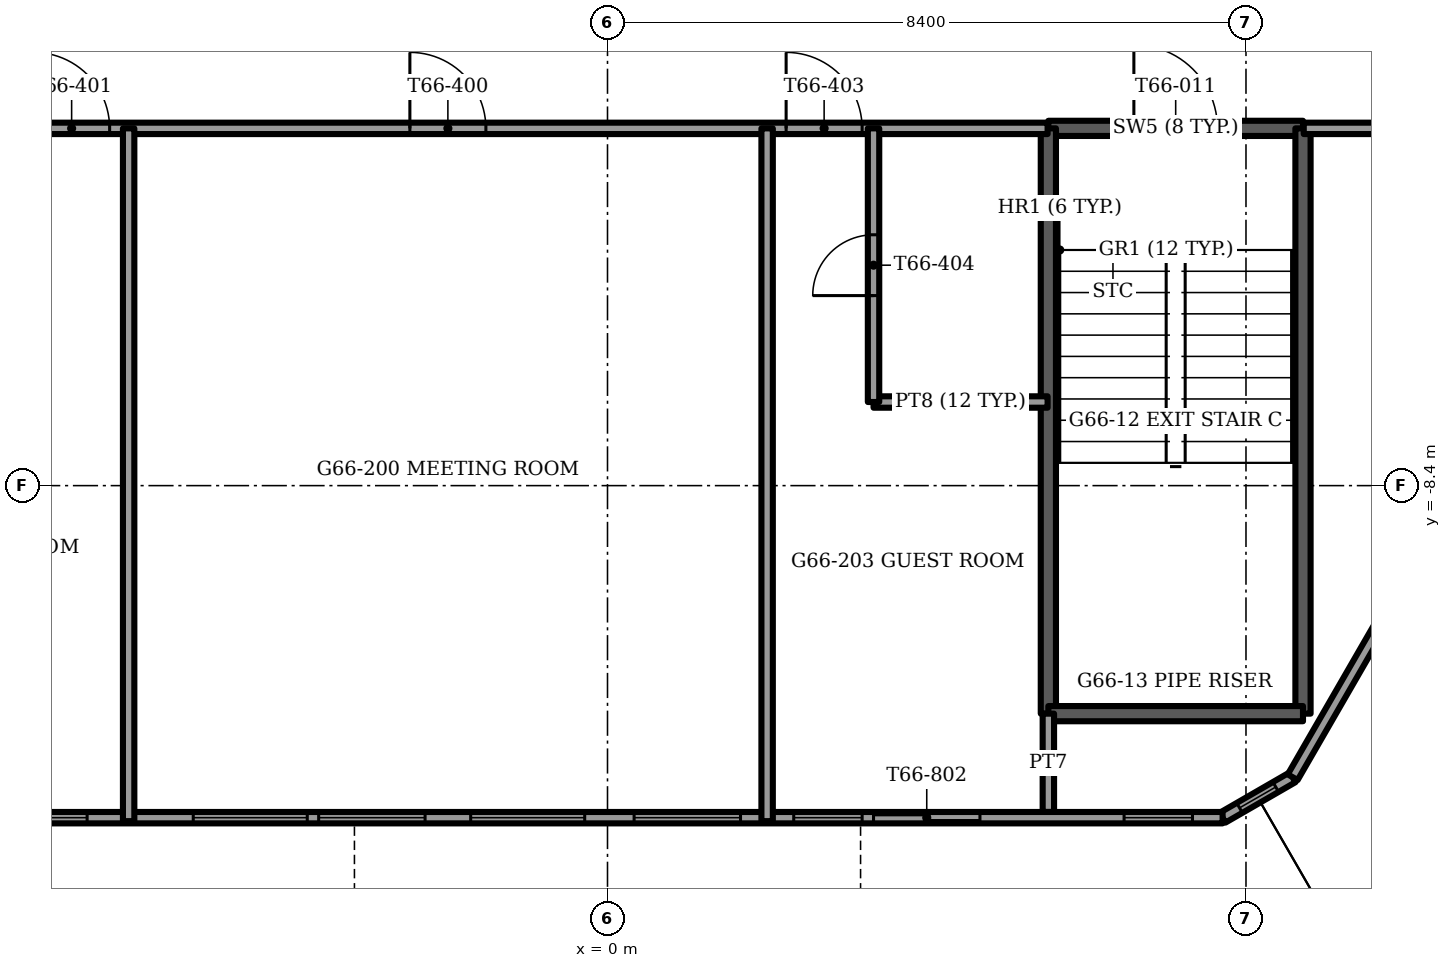
"""IFC4 building model, lengths in metres.
Left out: names, types, materials, properties, quantities, classifications, styles, units other than length and angle.
Written with IfcOpenShell. Run it as: python <this file> out.ifc"""

import sys

from ifc_helpers import new_model, si_unit, direction, frame, frame_2d, origin, place, context, subcontext, project, spatial, rectangle, extrude, element, fill, save


model = new_model("IFC4")
c1 = context("Model", 3, precision=1e-05, world=origin(), true_north=direction((0.0, 1.0)))
c2 = subcontext(c1, "Body", "Model", "MODEL_VIEW")
j1 = project(units=[si_unit("LENGTHUNIT", "METRE"), si_unit("PLANEANGLEUNIT", "RADIAN")], contexts=[c1])
p1 = place(None, origin())
s1 = spatial("IfcSite", under=j1, at=p1, CompositionType="ELEMENT")
p2 = place(p1, origin())
s2 = spatial("IfcBuilding", under=s1, at=p2, CompositionType="ELEMENT")
p3 = place(p2, frame((0.0, 0.0, 267.5)))
s3 = spatial("IfcBuildingStorey", under=s2, at=p3, CompositionType="ELEMENT", Elevation=267.5)
p4 = place(p3, frame((-8.092, -12.769, 0.0), z_axis=(0.0, 0.0, 1.0), x_axis=(1.0, 0.0, 0.0)))
e1 = element("IfcWall", 1, at=p4, inside=s3, PredefinedType="SOLIDWALL", context=c2, shape_type="SweptSolid", body=[
    extrude(rectangle(XDim=16.185, YDim=0.15, at=frame_2d((8.092, 0.0))), origin(), (0.0, 0.0, 1.0), 3.45),
])
p5 = place(p4, frame((2.642, 0.0, 0.15)))
e2 = element("IfcOpeningElement", 2, at=p5, cuts=e1, PredefinedType="OPENING", context=c2, shape_type="SweptSolid", body=[
    extrude(rectangle(XDim=1.5, YDim=2.85, at=frame_2d((0.75, 1.425))), frame((0.0, 0.075, 0.0), z_axis=(0.0, -1.0, 0.0), x_axis=(1.0, 0.0, 0.0)), (0.0, 0.0, 1.0), 0.15),
])
p6 = place(p4, frame((4.292, 0.0, 0.15)))
e3 = element("IfcOpeningElement", 3, at=p6, cuts=e1, PredefinedType="OPENING", context=c2, shape_type="SweptSolid", body=[
    extrude(rectangle(XDim=1.4, YDim=2.85, at=frame_2d((0.7, 1.425))), frame((0.0, 0.075, 0.0), z_axis=(0.0, -1.0, 0.0), x_axis=(1.0, 0.0, 0.0)), (0.0, 0.0, 1.0), 0.15),
])
p7 = place(p4, frame((6.292, 0.0, 0.15)))
e4 = element("IfcOpeningElement", 4, at=p7, cuts=e1, PredefinedType="OPENING", context=c2, shape_type="SweptSolid", body=[
    extrude(rectangle(XDim=1.5, YDim=2.85, at=frame_2d((0.75, 1.425))), frame((0.0, 0.075, 0.0), z_axis=(0.0, -1.0, 0.0), x_axis=(1.0, 0.0, 0.0)), (0.0, 0.0, 1.0), 0.15),
])
p8 = place(p4, frame((8.442, 0.0, 0.15)))
e5 = element("IfcOpeningElement", 5, at=p8, cuts=e1, PredefinedType="OPENING", context=c2, shape_type="SweptSolid", body=[
    extrude(rectangle(XDim=1.4, YDim=2.85, at=frame_2d((0.7, 1.425))), frame((0.0, 0.075, 0.0), z_axis=(0.0, -1.0, 0.0), x_axis=(1.0, 0.0, 0.0)), (0.0, 0.0, 1.0), 0.15),
])
p9 = place(p4, frame((10.542, 0.0, 0.15)))
e6 = element("IfcOpeningElement", 6, at=p9, cuts=e1, PredefinedType="OPENING", context=c2, shape_type="SweptSolid", body=[
    extrude(rectangle(XDim=0.9, YDim=2.85, at=frame_2d((0.45, 1.425))), frame((0.0, 0.075, 0.0), z_axis=(0.0, -1.0, 0.0), x_axis=(1.0, 0.0, 0.0)), (0.0, 0.0, 1.0), 0.15),
])
p10 = place(p4, frame((11.592, 0.0, 0.0)))
e7 = element("IfcOpeningElement", 7, at=p10, cuts=e1, PredefinedType="OPENING", context=c2, shape_type="SweptSolid", body=[
    extrude(rectangle(XDim=1.4, YDim=2.4, at=frame_2d((0.7, 1.2))), frame((0.0, 0.075, 0.0), z_axis=(0.0, -1.0, 0.0), x_axis=(1.0, 0.0, 0.0)), (0.0, 0.0, 1.0), 0.15),
])
p11 = place(p4, frame((0.346, 0.0, 0.15)))
e8 = element("IfcOpeningElement", 8, at=p11, cuts=e1, PredefinedType="OPENING", context=c2, shape_type="SweptSolid", body=[
    extrude(rectangle(XDim=0.9, YDim=2.73, at=frame_2d((0.45, 1.365))), frame((0.0, 0.075, 0.0), z_axis=(0.0, -1.0, 0.0), x_axis=(1.0, 0.0, 0.0)), (0.0, 0.0, 1.0), 0.15),
])
p12 = place(p4, frame((14.889, 0.0, 0.15)))
e9 = element("IfcOpeningElement", 9, at=p12, cuts=e1, PredefinedType="OPENING", context=c2, shape_type="SweptSolid", body=[
    extrude(rectangle(XDim=0.9, YDim=2.73, at=frame_2d((0.45, 1.365))), frame((0.0, 0.075, 0.0), z_axis=(0.0, -1.0, 0.0), x_axis=(1.0, 0.0, 0.0)), (0.0, 0.0, 1.0), 0.15),
])
p13 = place(p3, frame((9.015, -12.236, 0.0), z_axis=(0.0, 0.0, 1.0), x_axis=(0.499998361514, 0.866026349763, 0.0)))
e10 = element("IfcWall", 10, at=p13, inside=s3, PredefinedType="SOLIDWALL", context=c2, shape_type="SweptSolid", body=[
    extrude(rectangle(XDim=12.179, YDim=0.15, at=frame_2d((6.089, 0.0))), origin(), (0.0, 0.0, 1.0), 3.45),
])
p14 = place(p13, frame((2.189, 0.0, 0.15)))
e11 = element("IfcOpeningElement", 11, at=p14, cuts=e10, PredefinedType="OPENING", context=c2, shape_type="SweptSolid", body=[
    extrude(rectangle(XDim=1.5, YDim=2.85, at=frame_2d((0.75, 1.425))), frame((0.0, 0.075, 0.0), z_axis=(0.0, -1.0, 0.0), x_axis=(1.0, 0.0, 0.0)), (0.0, 0.0, 1.0), 0.15),
])
p15 = place(p13, frame((4.389, 0.0, 0.0)))
e12 = element("IfcOpeningElement", 12, at=p15, cuts=e10, PredefinedType="OPENING", context=c2, shape_type="SweptSolid", body=[
    extrude(rectangle(XDim=1.4, YDim=2.4, at=frame_2d((0.7, 1.2))), frame((0.0, 0.075, 0.0), z_axis=(0.0, -1.0, 0.0), x_axis=(1.0, 0.0, 0.0)), (0.0, 0.0, 1.0), 0.15),
])
p16 = place(p13, frame((6.389, 0.0, 0.15)))
e13 = element("IfcOpeningElement", 13, at=p16, cuts=e10, PredefinedType="OPENING", context=c2, shape_type="SweptSolid", body=[
    extrude(rectangle(XDim=0.9, YDim=2.85, at=frame_2d((0.45, 1.425))), frame((0.0, 0.075, 0.0), z_axis=(0.0, -1.0, 0.0), x_axis=(1.0, 0.0, 0.0)), (0.0, 0.0, 1.0), 0.15),
])
p17 = place(p13, frame((7.583, 0.0, 0.0)))
e14 = element("IfcOpeningElement", 14, at=p17, cuts=e10, PredefinedType="OPENING", context=c2, shape_type="SweptSolid", body=[
    extrude(rectangle(XDim=1.4, YDim=2.4, at=frame_2d((0.7, 1.2))), frame((0.0, 0.075, 0.0), z_axis=(0.0, -1.0, 0.0), x_axis=(1.0, 0.0, 0.0)), (0.0, 0.0, 1.0), 0.15),
])
p18 = place(p13, frame((10.834, 0.0, 0.15)))
e15 = element("IfcOpeningElement", 15, at=p18, cuts=e10, PredefinedType="OPENING", context=c2, shape_type="SweptSolid", body=[
    extrude(rectangle(XDim=0.9, YDim=2.73, at=frame_2d((0.45, 1.365))), frame((0.0, 0.075, 0.0), z_axis=(0.0, -1.0, 0.0), x_axis=(1.0, 0.0, 0.0)), (0.0, 0.0, 1.0), 0.15),
])
p19 = place(p3, frame((8.092, -12.769, 0.0), z_axis=(0.0, 0.0, 1.0), x_axis=(0.866048165231, 0.499960573946, 0.0)))
e16 = element("IfcWall", 16, at=p19, inside=s3, PredefinedType="SOLIDWALL", context=c2, shape_type="SweptSolid", body=[
    extrude(rectangle(XDim=1.065, YDim=0.15, at=frame_2d((0.532, 0.0))), origin(), (0.0, 0.0, 1.0), 3.45),
])
p20 = place(p19, frame((0.258, 0.0, 0.15)))
e17 = element("IfcOpeningElement", 17, at=p20, cuts=e16, PredefinedType="OPENING", context=c2, shape_type="SweptSolid", body=[
    extrude(rectangle(XDim=0.55, YDim=2.85, at=frame_2d((0.275, 1.425))), frame((0.0, 0.075, 0.0), z_axis=(0.0, -1.0, 0.0), x_axis=(1.0, 0.0, 0.0)), (0.0, 0.0, 1.0), 0.15),
])
p21 = place(p3, frame((5.8, -3.7, -0.3), z_axis=(0.0, 0.0, 1.0), x_axis=(1.0, 0.0, 0.0)))
e18 = element("IfcWall", 18, at=p21, inside=s3, PredefinedType="SOLIDWALL", context=c2, shape_type="SweptSolid", body=[
    extrude(rectangle(XDim=3.35, YDim=0.2, at=frame_2d((1.675, 0.0))), origin(), (0.0, 0.0, 1.0), 3.75),
])
p22 = place(p21, frame((1.125, 0.0, 0.0)))
e19 = element("IfcOpeningElement", 19, at=p22, cuts=e18, PredefinedType="OPENING", context=c2, shape_type="SweptSolid", body=[
    extrude(rectangle(XDim=1.1, YDim=2.1, at=frame_2d((0.55, 1.05))), frame((0.0, 0.1, 0.0), z_axis=(0.0, -1.0, 0.0), x_axis=(1.0, 0.0, 0.0)), (0.0, 0.0, 1.0), 0.2),
])
for number, where, z_axis, x_axis in (
    (20, (5.8, -3.7, -0.3), (0.0, 0.0, 1.0), (0.0, -1.0, 0.0)),
    (21, (9.15, -3.7, -0.3), (0.0, 0.0, 1.0), (0.0, -1.0, 0.0)),
):
    element("IfcWall", number, at=place(p3, frame(where, z_axis=z_axis, x_axis=x_axis)), inside=s3, PredefinedType="SOLIDWALL", context=c2, shape_type="SweptSolid", body=[
        extrude(rectangle(XDim=7.7, YDim=0.2, at=frame_2d((3.85, 0.0))), origin(), (0.0, 0.0, 1.0), 3.75),
    ])
p23 = place(p3, frame((5.8, -11.4, -0.3), z_axis=(0.0, 0.0, 1.0), x_axis=(1.0, 0.0, 0.0)))
e22 = element("IfcWall", 22, at=p23, inside=s3, PredefinedType="SOLIDWALL", context=c2, shape_type="SweptSolid", body=[
    extrude(rectangle(XDim=3.35, YDim=0.2, at=frame_2d((1.675, 0.0))), origin(), (0.0, 0.0, 1.0), 3.75),
])
p24 = place(p3, frame((5.8, -11.4, 0.0), z_axis=(0.0, 0.0, 1.0), x_axis=(0.0, -1.0, 0.0)))
e23 = element("IfcWall", 23, at=p24, inside=s3, PredefinedType="PARTITIONING", context=c2, shape_type="SweptSolid", body=[
    extrude(rectangle(XDim=1.294, YDim=0.15, at=frame_2d((0.647, 0.0))), origin(), (0.0, 0.0, 1.0), 3.45),
])
p25 = place(p3, frame((3.5, -7.3, 0.0), z_axis=(0.0, 0.0, 1.0), x_axis=(1.0, 0.0, 0.0)))
e24 = element("IfcWall", 24, at=p25, inside=s3, PredefinedType="PARTITIONING", context=c2, shape_type="SweptSolid", body=[
    extrude(rectangle(XDim=2.29, YDim=0.15, at=frame_2d((1.145, 0.0))), origin(), (0.0, 0.0, 1.0), 3.45),
])
p26 = place(p3, frame((-13.995, -3.7, 0.0), z_axis=(0.0, 0.0, 1.0), x_axis=(1.0, 0.0, 0.0)))
e25 = element("IfcWall", 25, at=p26, inside=s3, PredefinedType="PARTITIONING", context=c2, shape_type="SweptSolid", body=[
    extrude(rectangle(XDim=19.785, YDim=0.15, at=frame_2d((9.893, 0.0))), origin(), (0.0, 0.0, 1.0), 3.45),
])
p27 = place(p26, frame((11.395, 0.0, 0.0)))
e26 = element("IfcOpeningElement", 26, at=p27, cuts=e25, PredefinedType="OPENING", context=c2, shape_type="SweptSolid", body=[
    extrude(rectangle(XDim=1.0, YDim=2.1, at=frame_2d((0.5, 1.05))), frame((0.0, 0.075, 0.0), z_axis=(0.0, -1.0, 0.0), x_axis=(1.0, 0.0, 0.0)), (0.0, 0.0, 1.0), 0.15),
])
p28 = place(p26, frame((6.445, 0.0, 0.0)))
e27 = element("IfcOpeningElement", 27, at=p28, cuts=e25, PredefinedType="OPENING", context=c2, shape_type="SweptSolid", body=[
    extrude(rectangle(XDim=1.0, YDim=2.1, at=frame_2d((0.5, 1.05))), frame((0.0, 0.075, 0.0), z_axis=(0.0, -1.0, 0.0), x_axis=(1.0, 0.0, 0.0)), (0.0, 0.0, 1.0), 0.15),
])
p29 = place(p26, frame((16.345, 0.0, 0.0)))
e28 = element("IfcOpeningElement", 28, at=p29, cuts=e25, PredefinedType="OPENING", context=c2, shape_type="SweptSolid", body=[
    extrude(rectangle(XDim=1.0, YDim=2.1, at=frame_2d((0.5, 1.05))), frame((0.0, 0.075, 0.0), z_axis=(0.0, -1.0, 0.0), x_axis=(1.0, 0.0, 0.0)), (0.0, 0.0, 1.0), 0.15),
])
p30 = place(p3, frame((9.16, -3.7, 0.0), z_axis=(0.0, 0.0, 1.0), x_axis=(1.0, 0.0, 0.0)))
e29 = element("IfcWall", 29, at=p30, inside=s3, PredefinedType="PARTITIONING", context=c2, shape_type="SweptSolid", body=[
    extrude(rectangle(XDim=4.835, YDim=0.15, at=frame_2d((2.417, 0.0))), origin(), (0.0, 0.0, 1.0), 3.45),
])
p31 = place(p3, frame((3.5, -7.3, 0.0), z_axis=(0.0, 0.0, 1.0), x_axis=(0.0, 1.0, 0.0)))
e30 = element("IfcWall", 30, at=p31, inside=s3, PredefinedType="PARTITIONING", context=c2, shape_type="SweptSolid", body=[
    extrude(rectangle(XDim=3.6, YDim=0.15, at=frame_2d((1.8, 0.0))), origin(), (0.0, 0.0, 1.0), 3.45),
])
p32 = place(p31, frame((1.4, 0.0, 0.0)))
e31 = element("IfcOpeningElement", 31, at=p32, cuts=e30, PredefinedType="OPENING", context=c2, shape_type="SweptSolid", body=[
    extrude(rectangle(XDim=0.8, YDim=2.1, at=frame_2d((0.4, 1.05))), frame((0.0, 0.075, 0.0), z_axis=(0.0, -1.0, 0.0), x_axis=(1.0, 0.0, 0.0)), (0.0, 0.0, 1.0), 0.15),
])
for number, where, z_axis, x_axis in (
    (32, (2.1, -12.814, 0.0), (0.0, 0.0, 1.0), (0.0, 1.0, 0.0)),
    (33, (-6.3, -12.814, 0.0), (0.0, 0.0, 1.0), (0.0, 1.0, 0.0)),
):
    element("IfcWall", number, at=place(p3, frame(where, z_axis=z_axis, x_axis=x_axis)), inside=s3, PredefinedType="PARTITIONING", context=c2, shape_type="SweptSolid", body=[
        extrude(rectangle(XDim=9.114, YDim=0.15, at=frame_2d((4.557, 0.0))), origin(), (0.0, 0.0, 1.0), 3.45),
    ])
p33 = place(p5, origin())
e34 = element("IfcWindow", 34, at=p33, inside=s3, PartitioningType="SINGLE_PANEL", PredefinedType="WINDOW", context=c2, shape_type="SweptSolid", body=[
    extrude(rectangle(XDim=1.5, YDim=2.85, at=frame_2d((0.75, 1.425))), frame((0.0, 0.03, 0.0), z_axis=(0.0, -1.0, 0.0), x_axis=(1.0, 0.0, 0.0)), (0.0, 0.0, 1.0), 0.06),
])
fill(e2, e34)
p34 = place(p6, origin())
e35 = element("IfcWindow", 35, at=p34, inside=s3, PartitioningType="SINGLE_PANEL", PredefinedType="WINDOW", context=c2, shape_type="SweptSolid", body=[
    extrude(rectangle(XDim=1.4, YDim=2.85, at=frame_2d((0.7, 1.425))), frame((0.0, 0.03, 0.0), z_axis=(0.0, -1.0, 0.0), x_axis=(1.0, 0.0, 0.0)), (0.0, 0.0, 1.0), 0.06),
])
fill(e3, e35)
p35 = place(p7, origin())
e36 = element("IfcWindow", 36, at=p35, inside=s3, PartitioningType="SINGLE_PANEL", PredefinedType="WINDOW", context=c2, shape_type="SweptSolid", body=[
    extrude(rectangle(XDim=1.5, YDim=2.85, at=frame_2d((0.75, 1.425))), frame((0.0, 0.03, 0.0), z_axis=(0.0, -1.0, 0.0), x_axis=(1.0, 0.0, 0.0)), (0.0, 0.0, 1.0), 0.06),
])
fill(e4, e36)
p36 = place(p8, origin())
e37 = element("IfcWindow", 37, at=p36, inside=s3, PartitioningType="SINGLE_PANEL", PredefinedType="WINDOW", context=c2, shape_type="SweptSolid", body=[
    extrude(rectangle(XDim=1.4, YDim=2.85, at=frame_2d((0.7, 1.425))), frame((0.0, 0.03, 0.0), z_axis=(0.0, -1.0, 0.0), x_axis=(1.0, 0.0, 0.0)), (0.0, 0.0, 1.0), 0.06),
])
fill(e5, e37)
p37 = place(p9, origin())
e38 = element("IfcWindow", 38, at=p37, inside=s3, PartitioningType="SINGLE_PANEL", PredefinedType="WINDOW", context=c2, shape_type="SweptSolid", body=[
    extrude(rectangle(XDim=0.9, YDim=2.85, at=frame_2d((0.45, 1.425))), frame((0.0, 0.03, 0.0), z_axis=(0.0, -1.0, 0.0), x_axis=(1.0, 0.0, 0.0)), (0.0, 0.0, 1.0), 0.06),
])
fill(e6, e38)
p38 = place(p10, origin())
e39 = element("IfcDoor", 39, at=p38, inside=s3, OperationType="SLIDING_TO_LEFT", PredefinedType="DOOR", context=c2, shape_type="SweptSolid", body=[
    extrude(rectangle(XDim=1.4, YDim=2.4, at=frame_2d((0.7, 1.2))), frame((0.0, 0.025, 0.0), z_axis=(0.0, -1.0, 0.0), x_axis=(1.0, 0.0, 0.0)), (0.0, 0.0, 1.0), 0.05),
])
fill(e7, e39)
p39 = place(p11, origin())
e40 = element("IfcWindow", 40, at=p39, inside=s3, PartitioningType="SINGLE_PANEL", PredefinedType="WINDOW", context=c2, shape_type="SweptSolid", body=[
    extrude(rectangle(XDim=0.9, YDim=2.73, at=frame_2d((0.45, 1.365))), frame((0.0, 0.03, 0.0), z_axis=(0.0, -1.0, 0.0), x_axis=(1.0, 0.0, 0.0)), (0.0, 0.0, 1.0), 0.06),
])
fill(e8, e40)
p40 = place(p12, origin())
e41 = element("IfcWindow", 41, at=p40, inside=s3, PartitioningType="SINGLE_PANEL", PredefinedType="WINDOW", context=c2, shape_type="SweptSolid", body=[
    extrude(rectangle(XDim=0.9, YDim=2.73, at=frame_2d((0.45, 1.365))), frame((0.0, 0.03, 0.0), z_axis=(0.0, -1.0, 0.0), x_axis=(1.0, 0.0, 0.0)), (0.0, 0.0, 1.0), 0.06),
])
fill(e9, e41)
p41 = place(p20, origin())
e42 = element("IfcWindow", 42, at=p41, inside=s3, PartitioningType="SINGLE_PANEL", PredefinedType="WINDOW", context=c2, shape_type="SweptSolid", body=[
    extrude(rectangle(XDim=0.55, YDim=2.85, at=frame_2d((0.275, 1.425))), frame((0.0, 0.03, 0.0), z_axis=(0.0, -1.0, 0.0), x_axis=(1.0, 0.0, 0.0)), (0.0, 0.0, 1.0), 0.06),
])
fill(e17, e42)
p42 = place(p22, origin())
e43 = element("IfcDoor", 43, at=p42, inside=s3, OperationType="SINGLE_SWING_LEFT", PredefinedType="DOOR", context=c2, shape_type="SweptSolid", body=[
    extrude(rectangle(XDim=1.1, YDim=2.1, at=frame_2d((0.55, 1.05))), frame((0.0, 0.025, 0.0), z_axis=(0.0, -1.0, 0.0), x_axis=(1.0, 0.0, 0.0)), (0.0, 0.0, 1.0), 0.05),
])
fill(e19, e43)
p43 = place(p27, origin())
e44 = element("IfcDoor", 44, at=p43, inside=s3, OperationType="SINGLE_SWING_LEFT", PredefinedType="DOOR", context=c2, shape_type="SweptSolid", body=[
    extrude(rectangle(XDim=1.0, YDim=2.1, at=frame_2d((0.5, 1.05))), frame((0.0, 0.025, 0.0), z_axis=(0.0, -1.0, 0.0), x_axis=(1.0, 0.0, 0.0)), (0.0, 0.0, 1.0), 0.05),
])
fill(e26, e44)
p44 = place(p28, origin())
e45 = element("IfcDoor", 45, at=p44, inside=s3, OperationType="SINGLE_SWING_RIGHT", PredefinedType="DOOR", context=c2, shape_type="SweptSolid", body=[
    extrude(rectangle(XDim=1.0, YDim=2.1, at=frame_2d((0.5, 1.05))), frame((0.0, 0.025, 0.0), z_axis=(0.0, -1.0, 0.0), x_axis=(1.0, 0.0, 0.0)), (0.0, 0.0, 1.0), 0.05),
])
fill(e27, e45)
p45 = place(p29, origin())
e46 = element("IfcDoor", 46, at=p45, inside=s3, OperationType="SINGLE_SWING_LEFT", PredefinedType="DOOR", context=c2, shape_type="SweptSolid", body=[
    extrude(rectangle(XDim=1.0, YDim=2.1, at=frame_2d((0.5, 1.05))), frame((0.0, 0.025, 0.0), z_axis=(0.0, -1.0, 0.0), x_axis=(1.0, 0.0, 0.0)), (0.0, 0.0, 1.0), 0.05),
])
fill(e28, e46)
p46 = place(p32, origin())
e47 = element("IfcDoor", 47, at=p46, inside=s3, OperationType="SINGLE_SWING_RIGHT", PredefinedType="DOOR", context=c2, shape_type="SweptSolid", body=[
    extrude(rectangle(XDim=0.8, YDim=2.1, at=frame_2d((0.4, 1.05))), frame((0.0, 0.025, 0.0), z_axis=(0.0, -1.0, 0.0), x_axis=(1.0, 0.0, 0.0)), (0.0, 0.0, 1.0), 0.05),
])
fill(e31, e47)
save(model, sys.argv[1])
